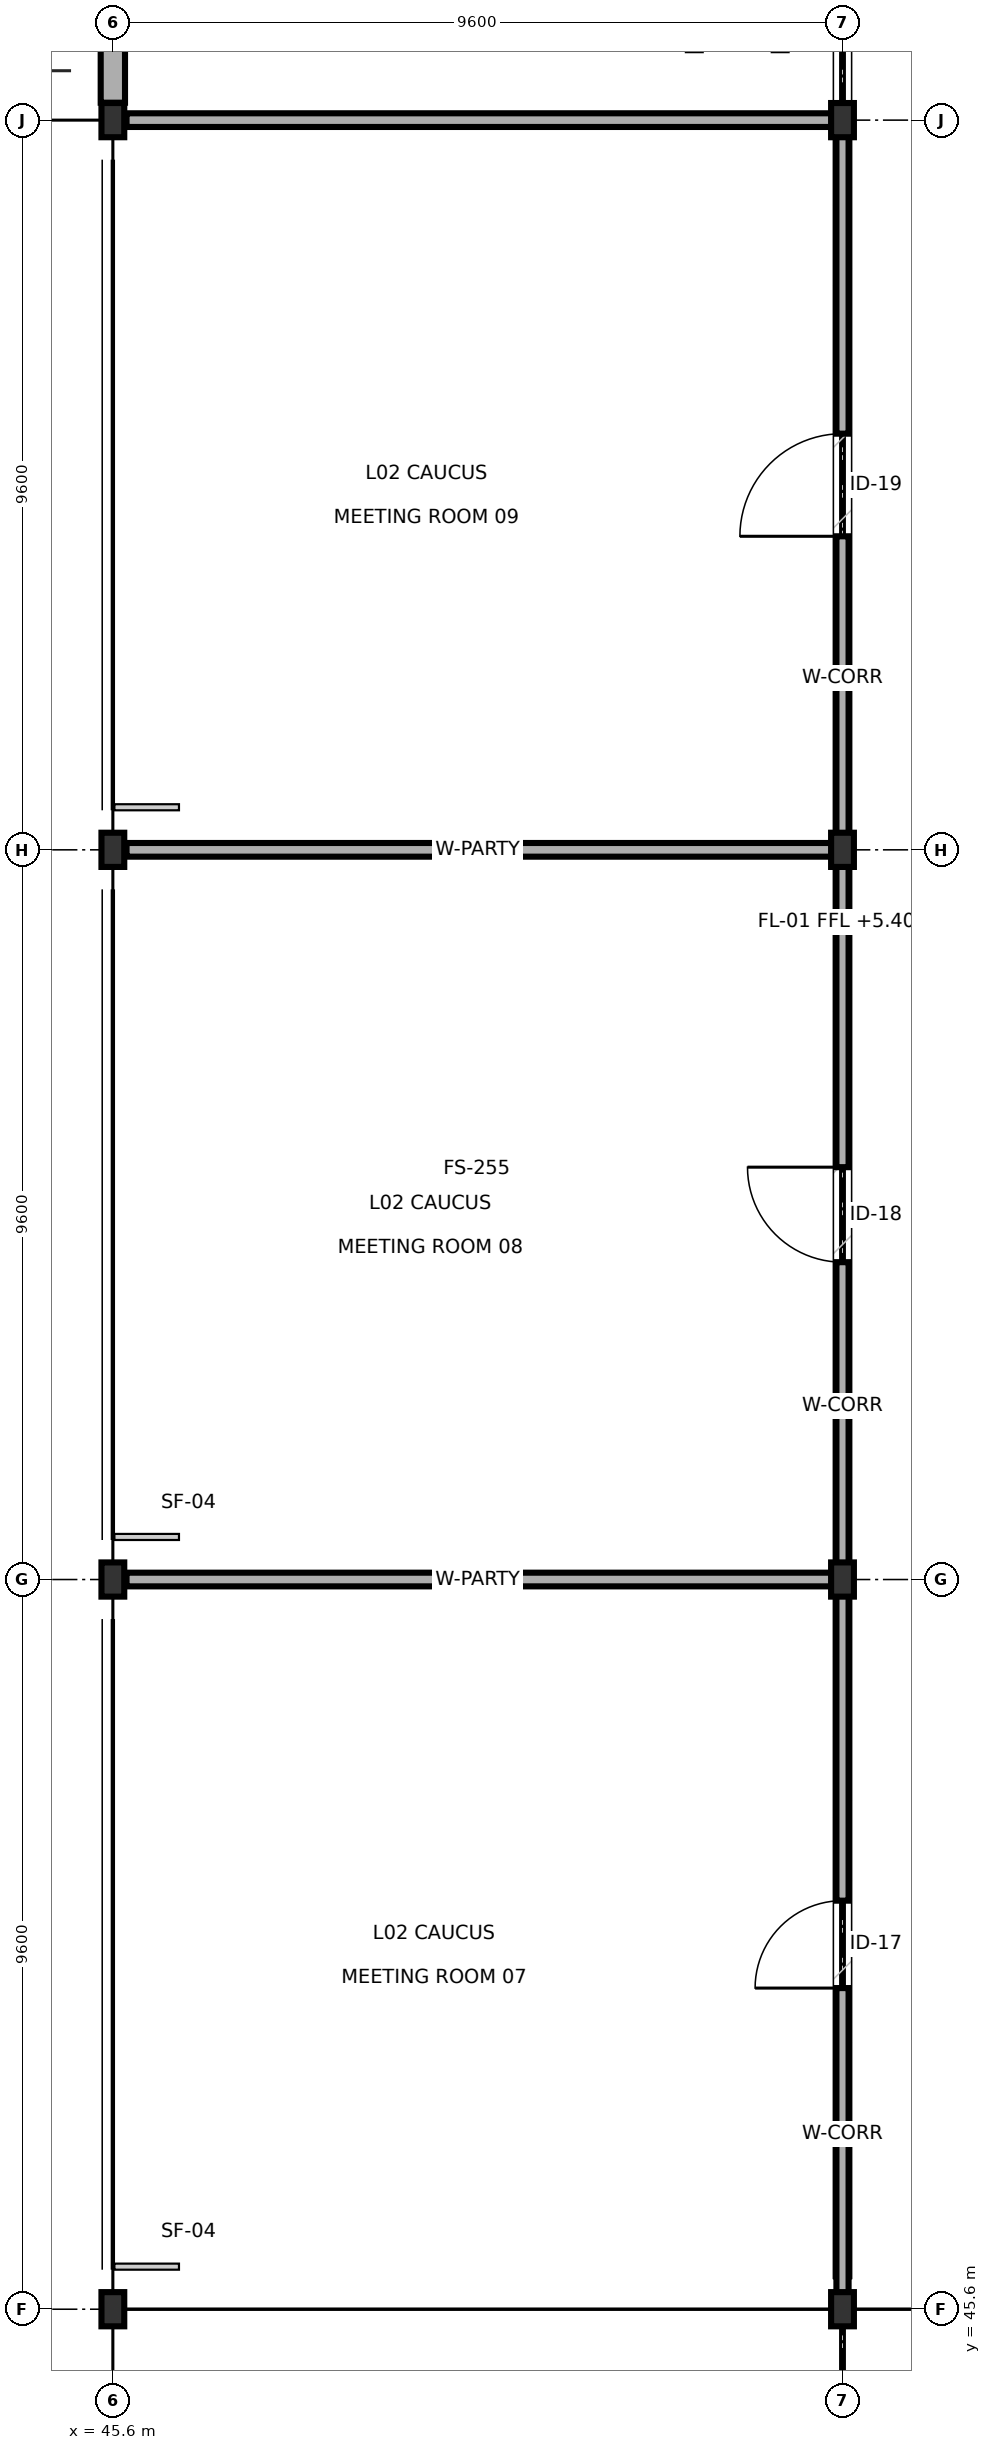
"""IFC4 building model, lengths in metres.
Left out: names, types, materials, properties, quantities, classifications, styles, units other than length and angle.
Written with IfcOpenShell. Run it as: python <this file> out.ifc"""

import sys

from ifc_helpers import new_model, si_unit, direction, frame, frame_2d, origin, origin_2d, place, context, subcontext, project, spatial, rectangle, i_section, extrude, element, fill, save


model = new_model("IFC4")
c1 = context("Model", 3, precision=1e-05, world=origin(), true_north=direction((0.0, 1.0)))
c2 = subcontext(c1, "Body", "Model", "MODEL_VIEW")
j1 = project(units=[si_unit("LENGTHUNIT", "METRE"), si_unit("PLANEANGLEUNIT", "RADIAN")], contexts=[c1])
p1 = place(None, origin())
s1 = spatial("IfcSite", under=j1, at=p1, CompositionType="ELEMENT")
p2 = place(p1, origin())
s2 = spatial("IfcBuilding", under=s1, at=p2, CompositionType="ELEMENT")
p3 = place(p2, frame((0.0, 0.0, 5.4)))
s3 = spatial("IfcBuildingStorey", under=s2, at=p3, CompositionType="ELEMENT", Elevation=5.4)
for number, where, z_axis, x_axis in (
    (1, (45.6, 45.6, 0.0), (0.0, 0.0, 1.0), (1.0, 0.0, 0.0)),
    (2, (45.6, 55.2, 0.0), (0.0, 0.0, 1.0), (1.0, 0.0, 0.0)),
    (3, (45.6, 64.8, 0.0), (0.0, 0.0, 1.0), (1.0, 0.0, 0.0)),
    (4, (45.6, 74.4, 0.0), (0.0, 0.0, 1.0), (1.0, 0.0, 0.0)),
    (5, (55.2, 45.6, 0.0), (0.0, 0.0, 1.0), (1.0, 0.0, 0.0)),
    (6, (55.2, 55.2, 0.0), (0.0, 0.0, 1.0), (1.0, 0.0, 0.0)),
    (7, (55.2, 64.8, 0.0), (0.0, 0.0, 1.0), (1.0, 0.0, 0.0)),
    (8, (55.2, 74.4, 0.0), (0.0, 0.0, 1.0), (1.0, 0.0, 0.0)),
):
    element("IfcColumn", number, at=place(p3, frame(where, z_axis=z_axis, x_axis=x_axis)), inside=s3, PredefinedType="COLUMN", context=c2, shape_type="SweptSolid", body=[
        extrude(i_section(OverallWidth=0.3, OverallDepth=0.45, WebThickness=0.014, FlangeThickness=0.026, FilletRadius=0.027, at=origin_2d()), origin(), (0.0, 0.0, 1.0), 4.5),
    ])
p4 = place(p3, frame((45.6, 74.629, 0.0), z_axis=(0.0, 0.0, 1.0), x_axis=(0.0, 1.0, 0.0)))
e9 = element("IfcWall", 9, at=p4, inside=s3, PredefinedType="SOLIDWALL", context=c2, shape_type="SweptSolid", body=[
    extrude(rectangle(XDim=9.142, YDim=0.32, at=frame_2d((4.571, 0.0))), origin(), (0.0, 0.0, 1.0), 3.675),
])
p5 = place(p4, frame((2.135, 0.0, 0.75)))
e10 = element("IfcOpeningElement", 10, at=p5, cuts=e9, PredefinedType="OPENING", context=c2, shape_type="SweptSolid", body=[
    extrude(rectangle(XDim=1.45, YDim=1.95, at=frame_2d((0.725, 0.975))), frame((0.0, 0.17, 0.0), z_axis=(0.0, -1.0, 0.0), x_axis=(1.0, 0.0, 0.0)), (0.0, 0.0, 1.0), 0.34),
])
p6 = place(p4, frame((5.556, 0.0, 0.75)))
e11 = element("IfcOpeningElement", 11, at=p6, cuts=e9, PredefinedType="OPENING", context=c2, shape_type="SweptSolid", body=[
    extrude(rectangle(XDim=1.45, YDim=1.95, at=frame_2d((0.725, 0.975))), frame((0.0, 0.17, 0.0), z_axis=(0.0, -1.0, 0.0), x_axis=(1.0, 0.0, 0.0)), (0.0, 0.0, 1.0), 0.34),
])
p7 = place(p3, frame((55.2, 45.7, 0.0), z_axis=(0.0, 0.0, 1.0), x_axis=(0.0, 1.0, 0.0)))
e12 = element("IfcWall", 12, at=p7, inside=s3, PredefinedType="PARTITIONING", context=c2, shape_type="SweptSolid", body=[
    extrude(rectangle(XDim=9.4, YDim=0.16, at=frame_2d((4.7, 0.0))), origin(), (0.0, 0.0, 1.0), 3.685),
])
p8 = place(p7, frame((4.125, 0.0, 0.0)))
e13 = element("IfcOpeningElement", 13, at=p8, cuts=e12, PredefinedType="OPENING", context=c2, shape_type="SweptSolid", body=[
    extrude(rectangle(XDim=1.15, YDim=2.22, at=frame_2d((0.575, 1.11))), frame((0.0, 0.09, 0.0), z_axis=(0.0, -1.0, 0.0), x_axis=(1.0, 0.0, 0.0)), (0.0, 0.0, 1.0), 0.18),
])
p9 = place(p3, frame((45.78, 55.2, 0.0), z_axis=(0.0, 0.0, 1.0), x_axis=(1.0, 0.0, 0.0)))
e14 = element("IfcWall", 14, at=p9, inside=s3, PredefinedType="PARTITIONING", context=c2, shape_type="SweptSolid", body=[
    extrude(rectangle(XDim=9.33, YDim=0.18, at=frame_2d((4.665, 0.0))), origin(), (0.0, 0.0, 1.0), 3.685),
])
p10 = place(p3, frame((55.2, 55.3, 0.0), z_axis=(0.0, 0.0, 1.0), x_axis=(0.0, 1.0, 0.0)))
e15 = element("IfcWall", 15, at=p10, inside=s3, PredefinedType="PARTITIONING", context=c2, shape_type="SweptSolid", body=[
    extrude(rectangle(XDim=9.4, YDim=0.16, at=frame_2d((4.7, 0.0))), origin(), (0.0, 0.0, 1.0), 3.685),
])
p11 = place(p10, frame((4.075, 0.0, 0.0)))
e16 = element("IfcOpeningElement", 16, at=p11, cuts=e15, PredefinedType="OPENING", context=c2, shape_type="SweptSolid", body=[
    extrude(rectangle(XDim=1.25, YDim=2.22, at=frame_2d((0.625, 1.11))), frame((0.0, 0.09, 0.0), z_axis=(0.0, -1.0, 0.0), x_axis=(1.0, 0.0, 0.0)), (0.0, 0.0, 1.0), 0.18),
])
p12 = place(p3, frame((45.78, 64.8, 0.0), z_axis=(0.0, 0.0, 1.0), x_axis=(1.0, 0.0, 0.0)))
e17 = element("IfcWall", 17, at=p12, inside=s3, PredefinedType="PARTITIONING", context=c2, shape_type="SweptSolid", body=[
    extrude(rectangle(XDim=9.33, YDim=0.18, at=frame_2d((4.665, 0.0))), origin(), (0.0, 0.0, 1.0), 3.685),
])
p13 = place(p3, frame((55.2, 64.9, 0.0), z_axis=(0.0, 0.0, 1.0), x_axis=(0.0, 1.0, 0.0)))
e18 = element("IfcWall", 18, at=p13, inside=s3, PredefinedType="PARTITIONING", context=c2, shape_type="SweptSolid", body=[
    extrude(rectangle(XDim=9.4, YDim=0.16, at=frame_2d((4.7, 0.0))), origin(), (0.0, 0.0, 1.0), 3.685),
])
p14 = place(p13, frame((4.025, 0.0, 0.0)))
e19 = element("IfcOpeningElement", 19, at=p14, cuts=e18, PredefinedType="OPENING", context=c2, shape_type="SweptSolid", body=[
    extrude(rectangle(XDim=1.35, YDim=2.24, at=frame_2d((0.675, 1.12))), frame((0.0, 0.09, 0.0), z_axis=(0.0, -1.0, 0.0), x_axis=(1.0, 0.0, 0.0)), (0.0, 0.0, 1.0), 0.18),
])
p15 = place(p3, frame((45.78, 74.4, 0.0), z_axis=(0.0, 0.0, 1.0), x_axis=(1.0, 0.0, 0.0)))
e20 = element("IfcWall", 20, at=p15, inside=s3, PredefinedType="PARTITIONING", context=c2, shape_type="SweptSolid", body=[
    extrude(rectangle(XDim=9.33, YDim=0.18, at=frame_2d((4.665, 0.0))), origin(), (0.0, 0.0, 1.0), 3.685),
])
p16 = place(p8, origin())
e21 = element("IfcDoor", 21, at=p16, inside=s3, OperationType="SINGLE_SWING_LEFT", PredefinedType="DOOR", context=c2, shape_type="SweptSolid", body=[
    extrude(rectangle(XDim=1.15, YDim=2.22, at=frame_2d((0.575, 1.11))), frame((0.0, 0.025, 0.0), z_axis=(0.0, -1.0, 0.0), x_axis=(1.0, 0.0, 0.0)), (0.0, 0.0, 1.0), 0.05),
])
fill(e13, e21)
p17 = place(p11, origin())
e22 = element("IfcDoor", 22, at=p17, inside=s3, OperationType="SINGLE_SWING_RIGHT", PredefinedType="DOOR", context=c2, shape_type="SweptSolid", body=[
    extrude(rectangle(XDim=1.25, YDim=2.22, at=frame_2d((0.625, 1.11))), frame((0.0, 0.025, 0.0), z_axis=(0.0, -1.0, 0.0), x_axis=(1.0, 0.0, 0.0)), (0.0, 0.0, 1.0), 0.05),
])
fill(e16, e22)
p18 = place(p14, origin())
e23 = element("IfcDoor", 23, at=p18, inside=s3, OperationType="SINGLE_SWING_LEFT", PredefinedType="DOOR", context=c2, shape_type="SweptSolid", body=[
    extrude(rectangle(XDim=1.35, YDim=2.24, at=frame_2d((0.675, 1.12))), frame((0.0, 0.025, 0.0), z_axis=(0.0, -1.0, 0.0), x_axis=(1.0, 0.0, 0.0)), (0.0, 0.0, 1.0), 0.05),
])
fill(e19, e23)
save(model, sys.argv[1])
